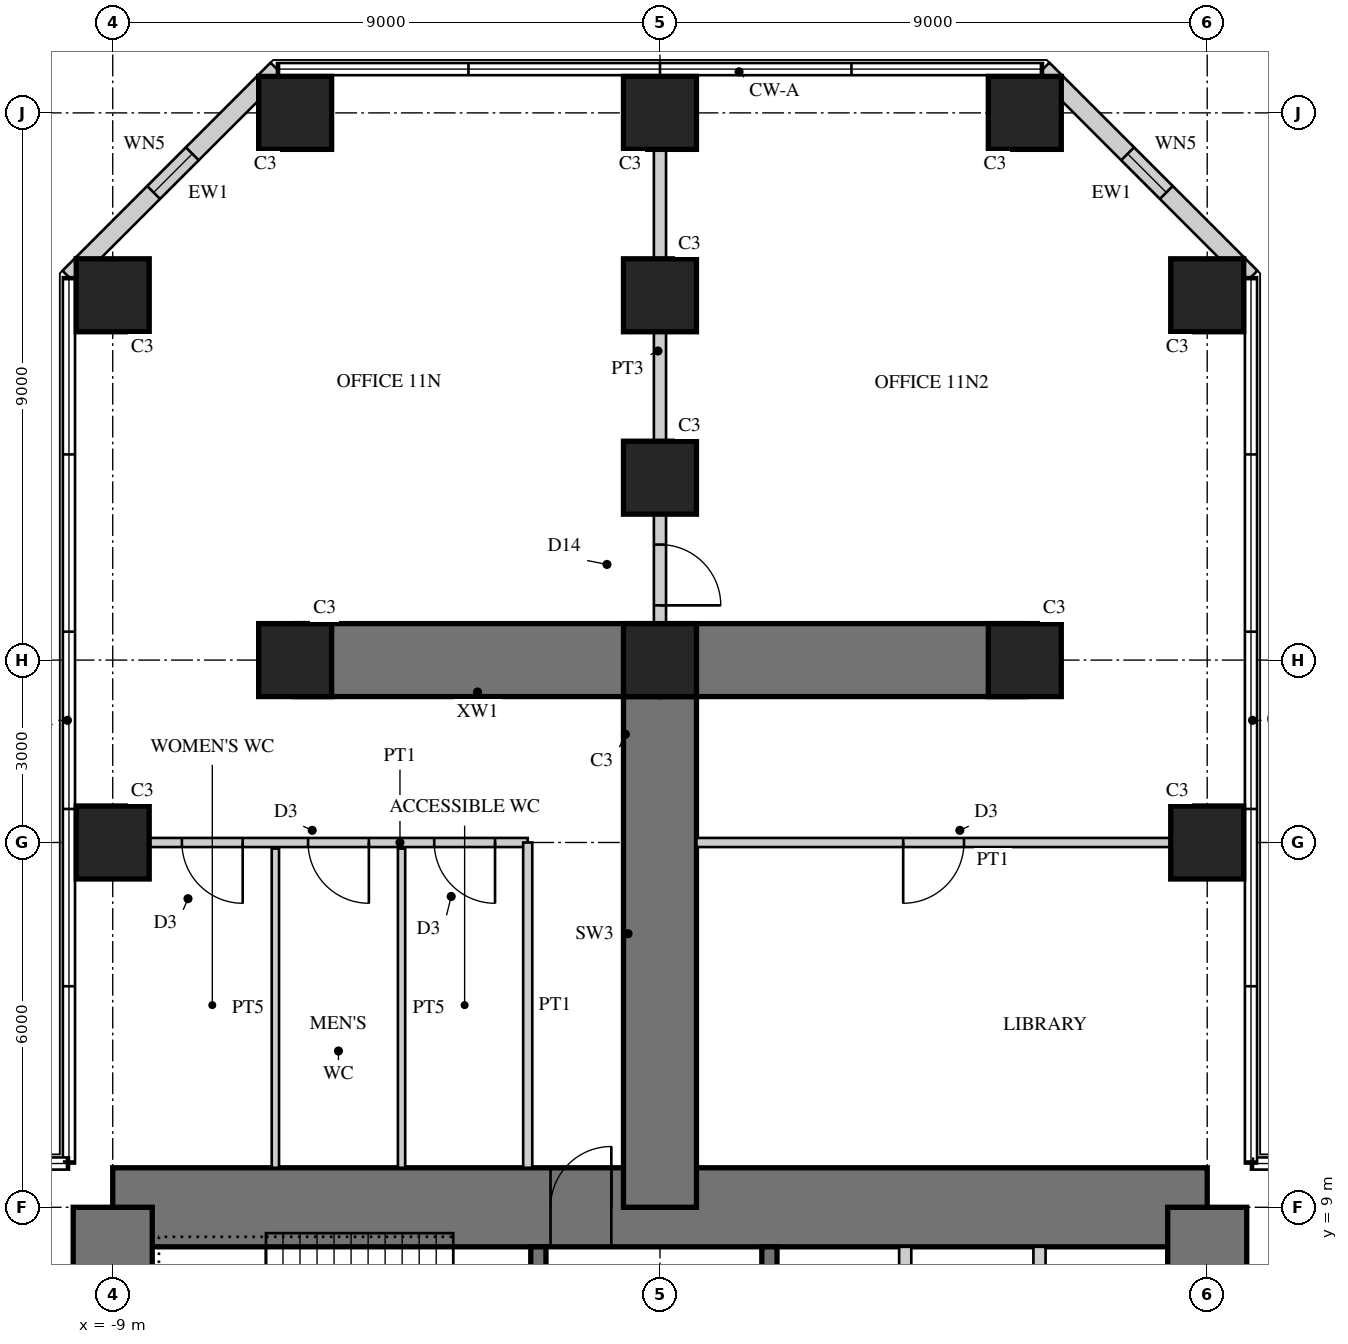
"""IFC4 building model, lengths in metres.
Left out: names, types, materials, properties, quantities, classifications, styles, units other than length and angle.
Written with IfcOpenShell. Run it as: python <this file> out.ifc"""

import sys

from ifc_helpers import new_model, si_unit, direction, frame, frame_2d, origin, origin_2d, place, context, subcontext, project, spatial, rectangle, hollow_rectangle, extrude, element, fill, save


model = new_model("IFC4")
c1 = context("Model", 3, precision=1e-05, world=origin(), true_north=direction((0.0, 1.0)))
c2 = subcontext(c1, "Body", "Model", "MODEL_VIEW")
j1 = project(units=[si_unit("LENGTHUNIT", "METRE"), si_unit("PLANEANGLEUNIT", "RADIAN")], contexts=[c1])
p1 = place(None, origin())
s1 = spatial("IfcSite", under=j1, at=p1, CompositionType="ELEMENT")
p2 = place(p1, origin())
s2 = spatial("IfcBuilding", under=s1, at=p2, CompositionType="ELEMENT")
p3 = place(p2, frame((0.0, 0.0, 47.5)))
s3 = spatial("IfcBuildingStorey", under=s2, at=p3, CompositionType="ELEMENT", Elevation=47.5)
p4 = place(p3, frame((9.0, 9.0, 0.0), z_axis=(0.0, 0.0, 1.0), x_axis=(-1.0, 0.0, 0.0)))
e1 = element("IfcWall", 1, at=p4, inside=s3, PredefinedType="SHEAR", context=c2, shape_type="SweptSolid", body=[
    extrude(rectangle(XDim=18.0, YDim=1.3, at=frame_2d((9.0, 0.0))), origin(), (0.0, 0.0, 1.0), 4.0),
])
p5 = place(p4, frame((9.8, 0.0, 0.0)))
e2 = element("IfcOpeningElement", 2, at=p5, cuts=e1, PredefinedType="OPENING", context=c2, shape_type="SweptSolid", body=[
    extrude(rectangle(XDim=1.0, YDim=2.4, at=frame_2d((0.5, 1.2))), frame((0.0, 0.66, 0.0), z_axis=(0.0, -1.0, 0.0), x_axis=(1.0, 0.0, 0.0)), (0.0, 0.0, 1.0), 1.32),
])
p6 = place(p3, frame((9.0, -9.0, 0.0), z_axis=(0.0, 0.0, 1.0), x_axis=(0.0, 1.0, 0.0)))
e3 = element("IfcWall", 3, at=p6, inside=s3, PredefinedType="SHEAR", context=c2, shape_type="SweptSolid", body=[
    extrude(rectangle(XDim=18.0, YDim=1.3, at=frame_2d((9.0, 0.0))), origin(), (0.0, 0.0, 1.0), 4.0),
])
p7 = place(p6, frame((9.8, 0.0, 0.0)))
e4 = element("IfcOpeningElement", 4, at=p7, cuts=e3, PredefinedType="OPENING", context=c2, shape_type="SweptSolid", body=[
    extrude(rectangle(XDim=1.0, YDim=2.4, at=frame_2d((0.5, 1.2))), frame((0.0, 0.66, 0.0), z_axis=(0.0, -1.0, 0.0), x_axis=(1.0, 0.0, 0.0)), (0.0, 0.0, 1.0), 1.32),
])
p8 = place(p3, frame((-9.0, 9.0, 0.0), z_axis=(0.0, 0.0, 1.0), x_axis=(0.0, -1.0, 0.0)))
e5 = element("IfcWall", 5, at=p8, inside=s3, PredefinedType="SHEAR", context=c2, shape_type="SweptSolid", body=[
    extrude(rectangle(XDim=18.0, YDim=1.3, at=frame_2d((9.0, 0.0))), origin(), (0.0, 0.0, 1.0), 4.0),
])
p9 = place(p8, frame((9.8, 0.0, 0.0)))
e6 = element("IfcOpeningElement", 6, at=p9, cuts=e5, PredefinedType="OPENING", context=c2, shape_type="SweptSolid", body=[
    extrude(rectangle(XDim=1.0, YDim=2.4, at=frame_2d((0.5, 1.2))), frame((0.0, 0.66, 0.0), z_axis=(0.0, -1.0, 0.0), x_axis=(1.0, 0.0, 0.0)), (0.0, 0.0, 1.0), 1.32),
])
p10 = place(p3, frame((1.8, 1.875, 0.0), z_axis=(0.0, 0.0, 1.0), x_axis=(0.0, 1.0, 0.0)))
e7 = element("IfcWall", 7, at=p10, inside=s3, PredefinedType="SHEAR", context=c2, shape_type="SweptSolid", body=[
    extrude(rectangle(XDim=6.475, YDim=0.25, at=frame_2d((3.238, 0.0))), origin(), (0.0, 0.0, 1.0), 4.0),
])
p11 = place(p10, frame((1.875, 0.0, 0.0)))
e8 = element("IfcOpeningElement", 8, at=p11, cuts=e7, PredefinedType="OPENING", context=c2, shape_type="SweptSolid", body=[
    extrude(rectangle(XDim=1.6, YDim=2.4, at=frame_2d((0.8, 1.2))), frame((0.0, 0.135, 0.0), z_axis=(0.0, -1.0, 0.0), x_axis=(1.0, 0.0, 0.0)), (0.0, 0.0, 1.0), 0.27),
])
for number, where, z_axis, x_axis in (
    (9, (4.033, 5.975, 0.0), (0.0, 0.0, 1.0), (0.0, 1.0, 0.0)),
    (10, (6.242, 5.975, 0.0), (0.0, 0.0, 1.0), (0.0, 1.0, 0.0)),
):
    element("IfcWall", number, at=place(p3, frame(where, z_axis=z_axis, x_axis=x_axis)), inside=s3, PredefinedType="PARTITIONING", context=c2, shape_type="SweptSolid", body=[
        extrude(rectangle(XDim=2.375, YDim=0.2, at=frame_2d((1.188, 0.0))), origin(), (0.0, 0.0, 1.0), 4.0),
    ])
p12 = place(p3, frame((-2.0, 1.675, 0.0), z_axis=(0.0, 0.0, 1.0), x_axis=(0.0, 1.0, 0.0)))
e11 = element("IfcWall", 11, at=p12, inside=s3, PredefinedType="SHEAR", context=c2, shape_type="SweptSolid", body=[
    extrude(rectangle(XDim=6.675, YDim=0.25, at=frame_2d((3.337, 0.0))), origin(), (0.0, 0.0, 1.0), 4.0),
])
p13 = place(p12, frame((0.725, 0.0, 0.0)))
e12 = element("IfcOpeningElement", 12, at=p13, cuts=e11, PredefinedType="OPENING", context=c2, shape_type="SweptSolid", body=[
    extrude(rectangle(XDim=1.0, YDim=2.1, at=frame_2d((0.5, 1.05))), frame((0.0, 0.135, 0.0), z_axis=(0.0, -1.0, 0.0), x_axis=(1.0, 0.0, 0.0)), (0.0, 0.0, 1.0), 0.27),
])
p14 = place(p3, frame((0.0, 9.0, 0.0), z_axis=(0.0, 0.0, 1.0), x_axis=(0.0, 1.0, 0.0)))
e13 = element("IfcWall", 13, at=p14, inside=s3, PredefinedType="SHEAR", context=c2, shape_type="SweptSolid", body=[
    extrude(rectangle(XDim=9.0, YDim=1.2, at=frame_2d((4.5, 0.0))), origin(), (0.0, 0.0, 1.0), 4.0),
])
for number, where, z_axis, x_axis in (
    (14, (0.0, 18.0, 0.0), (0.0, 0.0, 1.0), (-1.0, 0.0, 0.0)),
    (15, (0.0, 18.0, 0.0), (0.0, 0.0, 1.0), (1.0, 0.0, 0.0)),
):
    element("IfcWall", number, at=place(p3, frame(where, z_axis=z_axis, x_axis=x_axis)), inside=s3, PredefinedType="SHEAR", context=c2, shape_type="SweptSolid", body=[
        extrude(rectangle(XDim=6.0, YDim=1.2, at=frame_2d((3.0, 0.0))), origin(), (0.0, 0.0, 1.0), 4.0),
    ])
for number, where, z_axis, x_axis in (
    (16, (9.0, 15.0, 0.0), (0.0, 0.0, 1.0), (1.0, 0.0, 0.0)),
    (17, (9.0, 24.0, 0.0), (0.0, 0.0, 1.0), (1.0, 0.0, 0.0)),
    (18, (-9.0, 15.0, 0.0), (0.0, 0.0, 1.0), (1.0, 0.0, 0.0)),
    (19, (-9.0, 24.0, 0.0), (0.0, 0.0, 1.0), (1.0, 0.0, 0.0)),
    (20, (6.0, 27.0, 0.0), (0.0, 0.0, 1.0), (1.0, 0.0, 0.0)),
    (21, (0.0, 27.0, 0.0), (0.0, 0.0, 1.0), (1.0, 0.0, 0.0)),
    (22, (-6.0, 27.0, 0.0), (0.0, 0.0, 1.0), (1.0, 0.0, 0.0)),
    (23, (6.0, 18.0, 0.0), (0.0, 0.0, 1.0), (1.0, 0.0, 0.0)),
    (24, (0.0, 18.0, 0.0), (0.0, 0.0, 1.0), (1.0, 0.0, 0.0)),
    (25, (-6.0, 18.0, 0.0), (0.0, 0.0, 1.0), (1.0, 0.0, 0.0)),
    (26, (0.0, 21.0, 0.0), (0.0, 0.0, 1.0), (1.0, 0.0, 0.0)),
    (27, (0.0, 24.0, 0.0), (0.0, 0.0, 1.0), (1.0, 0.0, 0.0)),
):
    element("IfcColumn", number, at=place(p3, frame(where, z_axis=z_axis, x_axis=x_axis)), inside=s3, PredefinedType="COLUMN", context=c2, shape_type="SweptSolid", body=[
        extrude(rectangle(XDim=1.2, YDim=1.2, at=origin_2d()), origin(), (0.0, 0.0, 1.0), 4.0),
    ])
p15 = place(p3, frame((9.72, 24.298, 0.0), z_axis=(0.0, 0.0, 1.0), x_axis=(-0.707106781187, 0.707106781187, 0.0)))
e28 = element("IfcWall", 28, at=p15, inside=s3, PredefinedType="SOLIDWALL", context=c2, shape_type="SweptSolid", body=[
    extrude(rectangle(XDim=4.839, YDim=0.3, at=frame_2d((2.419, 0.0))), origin(), (0.0, 0.0, 1.0), 3.8),
])
p16 = place(p15, frame((1.969, 0.0, 0.3)))
e29 = element("IfcOpeningElement", 29, at=p16, cuts=e28, PredefinedType="OPENING", context=c2, shape_type="SweptSolid", body=[
    extrude(rectangle(XDim=0.9, YDim=2.4, at=frame_2d((0.45, 1.2))), frame((0.0, 0.16, 0.0), z_axis=(0.0, -1.0, 0.0), x_axis=(1.0, 0.0, 0.0)), (0.0, 0.0, 1.0), 0.32),
])
p17 = place(p3, frame((-6.298, 27.72, 0.0), z_axis=(0.0, 0.0, 1.0), x_axis=(-0.707106781187, -0.707106781187, 0.0)))
e30 = element("IfcWall", 30, at=p17, inside=s3, PredefinedType="SOLIDWALL", context=c2, shape_type="SweptSolid", body=[
    extrude(rectangle(XDim=4.839, YDim=0.3, at=frame_2d((2.419, 0.0))), origin(), (0.0, 0.0, 1.0), 3.8),
])
p18 = place(p17, frame((1.969, 0.0, 0.3)))
e31 = element("IfcOpeningElement", 31, at=p18, cuts=e30, PredefinedType="OPENING", context=c2, shape_type="SweptSolid", body=[
    extrude(rectangle(XDim=0.9, YDim=2.4, at=frame_2d((0.45, 1.2))), frame((0.0, 0.16, 0.0), z_axis=(0.0, -1.0, 0.0), x_axis=(1.0, 0.0, 0.0)), (0.0, 0.0, 1.0), 0.32),
])
p19 = place(p3, frame((-2.175, 15.0, 0.0), z_axis=(0.0, 0.0, 1.0), x_axis=(-1.0, 0.0, 0.0)))
e32 = element("IfcWall", 32, at=p19, inside=s3, PredefinedType="PARTITIONING", context=c2, shape_type="SweptSolid", body=[
    extrude(rectangle(XDim=6.225, YDim=0.15, at=frame_2d((3.112, 0.0))), origin(), (0.0, 0.0, 1.0), 2.95),
])
p20 = place(p19, frame((0.538, 0.0, 0.0)))
e33 = element("IfcOpeningElement", 33, at=p20, cuts=e32, PredefinedType="OPENING", context=c2, shape_type="SweptSolid", body=[
    extrude(rectangle(XDim=1.0, YDim=2.1, at=frame_2d((0.5, 1.05))), frame((0.0, 0.085, 0.0), z_axis=(0.0, -1.0, 0.0), x_axis=(1.0, 0.0, 0.0)), (0.0, 0.0, 1.0), 0.17),
])
p21 = place(p19, frame((2.613, 0.0, 0.0)))
e34 = element("IfcOpeningElement", 34, at=p21, cuts=e32, PredefinedType="OPENING", context=c2, shape_type="SweptSolid", body=[
    extrude(rectangle(XDim=1.0, YDim=2.1, at=frame_2d((0.5, 1.05))), frame((0.0, 0.085, 0.0), z_axis=(0.0, -1.0, 0.0), x_axis=(1.0, 0.0, 0.0)), (0.0, 0.0, 1.0), 0.17),
])
p22 = place(p19, frame((4.688, 0.0, 0.0)))
e35 = element("IfcOpeningElement", 35, at=p22, cuts=e32, PredefinedType="OPENING", context=c2, shape_type="SweptSolid", body=[
    extrude(rectangle(XDim=1.0, YDim=2.1, at=frame_2d((0.5, 1.05))), frame((0.0, 0.085, 0.0), z_axis=(0.0, -1.0, 0.0), x_axis=(1.0, 0.0, 0.0)), (0.0, 0.0, 1.0), 0.17),
])
p23 = place(p3, frame((-2.175, 9.65, 0.0), z_axis=(0.0, 0.0, 1.0), x_axis=(0.0, 1.0, 0.0)))
e36 = element("IfcWall", 36, at=p23, inside=s3, PredefinedType="PARTITIONING", context=c2, shape_type="SweptSolid", body=[
    extrude(rectangle(XDim=5.35, YDim=0.15, at=frame_2d((2.675, 0.0))), origin(), (0.0, 0.0, 1.0), 3.8),
])
for number, where, z_axis, x_axis in (
    (37, (-4.25, 9.65, 0.0), (0.0, 0.0, 1.0), (0.0, 1.0, 0.0)),
    (38, (-6.325, 9.65, 0.0), (0.0, 0.0, 1.0), (0.0, 1.0, 0.0)),
):
    element("IfcWall", number, at=place(p3, frame(where, z_axis=z_axis, x_axis=x_axis)), inside=s3, PredefinedType="PLUMBINGWALL", context=c2, shape_type="SweptSolid", body=[
        extrude(rectangle(XDim=5.25, YDim=0.12, at=frame_2d((2.625, 0.0))), origin(), (0.0, 0.0, 1.0), 3.8),
    ])
p24 = place(p3, frame((8.4, 15.0, 0.0), z_axis=(0.0, 0.0, 1.0), x_axis=(-1.0, 0.0, 0.0)))
e39 = element("IfcWall", 39, at=p24, inside=s3, PredefinedType="PARTITIONING", context=c2, shape_type="SweptSolid", body=[
    extrude(rectangle(XDim=7.8, YDim=0.15, at=frame_2d((3.9, 0.0))), origin(), (0.0, 0.0, 1.0), 2.95),
])
p25 = place(p24, frame((3.4, 0.0, 0.0)))
e40 = element("IfcOpeningElement", 40, at=p25, cuts=e39, PredefinedType="OPENING", context=c2, shape_type="SweptSolid", body=[
    extrude(rectangle(XDim=1.0, YDim=2.1, at=frame_2d((0.5, 1.05))), frame((0.0, 0.085, 0.0), z_axis=(0.0, -1.0, 0.0), x_axis=(1.0, 0.0, 0.0)), (0.0, 0.0, 1.0), 0.17),
])
p26 = place(p3, frame((0.0, 18.0, 0.0), z_axis=(0.0, 0.0, 1.0), x_axis=(0.0, 1.0, 0.0)))
e41 = element("IfcWall", 41, at=p26, inside=s3, PredefinedType="SOLIDWALL", context=c2, shape_type="SweptSolid", body=[
    extrude(rectangle(XDim=3.0, YDim=0.2, at=frame_2d((1.5, 0.0))), origin(), (0.0, 0.0, 1.0), 3.8),
])
p27 = place(p26, frame((0.9, 0.0, 0.0)))
e42 = element("IfcOpeningElement", 42, at=p27, cuts=e41, PredefinedType="OPENING", context=c2, shape_type="SweptSolid", body=[
    extrude(rectangle(XDim=1.0, YDim=2.2, at=frame_2d((0.5, 1.1))), frame((0.0, 0.11, 0.0), z_axis=(0.0, -1.0, 0.0), x_axis=(1.0, 0.0, 0.0)), (0.0, 0.0, 1.0), 0.22),
])
p28 = place(p3, frame((0.0, 21.0, 0.0), z_axis=(0.0, 0.0, 1.0), x_axis=(0.0, 1.0, 0.0)))
e43 = element("IfcWall", 43, at=p28, inside=s3, PredefinedType="SOLIDWALL", context=c2, shape_type="SweptSolid", body=[
    extrude(rectangle(XDim=6.0, YDim=0.2, at=frame_2d((3.0, 0.0))), origin(), (0.0, 0.0, 1.0), 2.9),
])
p29 = place(p16, origin())
e44 = element("IfcWindow", 44, at=p29, inside=s3, PartitioningType="SINGLE_PANEL", PredefinedType="WINDOW", context=c2, shape_type="SweptSolid", body=[
    extrude(hollow_rectangle(XDim=0.9, YDim=2.4, WallThickness=0.06, at=frame_2d((0.45, 1.2))), frame((0.0, 0.03, 0.0), z_axis=(0.0, -1.0, 0.0), x_axis=(1.0, 0.0, 0.0)), (0.0, 0.0, 1.0), 0.06),
    extrude(rectangle(XDim=0.779, YDim=2.279, at=frame_2d((0.45, 1.2))), frame((0.0, 0.03, 0.0), z_axis=(0.0, -1.0, 0.0), x_axis=(1.0, 0.0, 0.0)), (0.0, 0.0, 1.0), 0.06),
])
fill(e29, e44)
p30 = place(p18, origin())
e45 = element("IfcWindow", 45, at=p30, inside=s3, PartitioningType="SINGLE_PANEL", PredefinedType="WINDOW", context=c2, shape_type="SweptSolid", body=[
    extrude(hollow_rectangle(XDim=0.9, YDim=2.4, WallThickness=0.06, at=frame_2d((0.45, 1.2))), frame((0.0, 0.03, 0.0), z_axis=(0.0, -1.0, 0.0), x_axis=(1.0, 0.0, 0.0)), (0.0, 0.0, 1.0), 0.06),
    extrude(rectangle(XDim=0.779, YDim=2.279, at=frame_2d((0.45, 1.2))), frame((0.0, 0.03, 0.0), z_axis=(0.0, -1.0, 0.0), x_axis=(1.0, 0.0, 0.0)), (0.0, 0.0, 1.0), 0.06),
])
fill(e31, e45)
p31 = place(p20, origin())
e46 = element("IfcDoor", 46, at=p31, inside=s3, OperationType="SINGLE_SWING_LEFT", PredefinedType="DOOR", context=c2, shape_type="SweptSolid", body=[
    extrude(rectangle(XDim=1.0, YDim=2.1, at=frame_2d((0.5, 1.05))), frame((0.0, 0.025, 0.0), z_axis=(0.0, -1.0, 0.0), x_axis=(1.0, 0.0, 0.0)), (0.0, 0.0, 1.0), 0.05),
])
fill(e33, e46)
p32 = place(p21, origin())
e47 = element("IfcDoor", 47, at=p32, inside=s3, OperationType="SINGLE_SWING_LEFT", PredefinedType="DOOR", context=c2, shape_type="SweptSolid", body=[
    extrude(rectangle(XDim=1.0, YDim=2.1, at=frame_2d((0.5, 1.05))), frame((0.0, 0.025, 0.0), z_axis=(0.0, -1.0, 0.0), x_axis=(1.0, 0.0, 0.0)), (0.0, 0.0, 1.0), 0.05),
])
fill(e34, e47)
p33 = place(p22, origin())
e48 = element("IfcDoor", 48, at=p33, inside=s3, OperationType="SINGLE_SWING_LEFT", PredefinedType="DOOR", context=c2, shape_type="SweptSolid", body=[
    extrude(rectangle(XDim=1.0, YDim=2.1, at=frame_2d((0.5, 1.05))), frame((0.0, 0.025, 0.0), z_axis=(0.0, -1.0, 0.0), x_axis=(1.0, 0.0, 0.0)), (0.0, 0.0, 1.0), 0.05),
])
fill(e35, e48)
p34 = place(p25, origin())
e49 = element("IfcDoor", 49, at=p34, inside=s3, OperationType="SINGLE_SWING_RIGHT", PredefinedType="DOOR", context=c2, shape_type="SweptSolid", body=[
    extrude(rectangle(XDim=1.0, YDim=2.1, at=frame_2d((0.5, 1.05))), frame((0.0, 0.025, 0.0), z_axis=(0.0, -1.0, 0.0), x_axis=(1.0, 0.0, 0.0)), (0.0, 0.0, 1.0), 0.05),
])
fill(e40, e49)
p35 = place(p27, frame((1.0, 0.0, 0.0), z_axis=(0.0, 0.0, 1.0), x_axis=(-1.0, 0.0, 0.0)))
e50 = element("IfcDoor", 50, at=p35, inside=s3, OperationType="SINGLE_SWING_RIGHT", PredefinedType="DOOR", context=c2, shape_type="SweptSolid", body=[
    extrude(rectangle(XDim=1.0, YDim=2.2, at=frame_2d((0.5, 1.1))), frame((0.0, 0.025, 0.0), z_axis=(0.0, -1.0, 0.0), x_axis=(1.0, 0.0, 0.0)), (0.0, 0.0, 1.0), 0.05),
])
fill(e42, e50)
p36 = place(p5, frame((1.0, 0.0, 0.0), z_axis=(0.0, 0.0, 1.0), x_axis=(-1.0, 0.0, 0.0)))
e51 = element("IfcDoor", 51, at=p36, inside=s3, OperationType="SINGLE_SWING_RIGHT", PredefinedType="DOOR", context=c2, shape_type="SweptSolid", body=[
    extrude(rectangle(XDim=1.0, YDim=2.4, at=frame_2d((0.5, 1.2))), frame((0.0, -0.005, 0.0), z_axis=(0.0, -1.0, 0.0), x_axis=(1.0, 0.0, 0.0)), (0.0, 0.0, 1.0), 0.05),
])
fill(e2, e51)
save(model, sys.argv[1])
